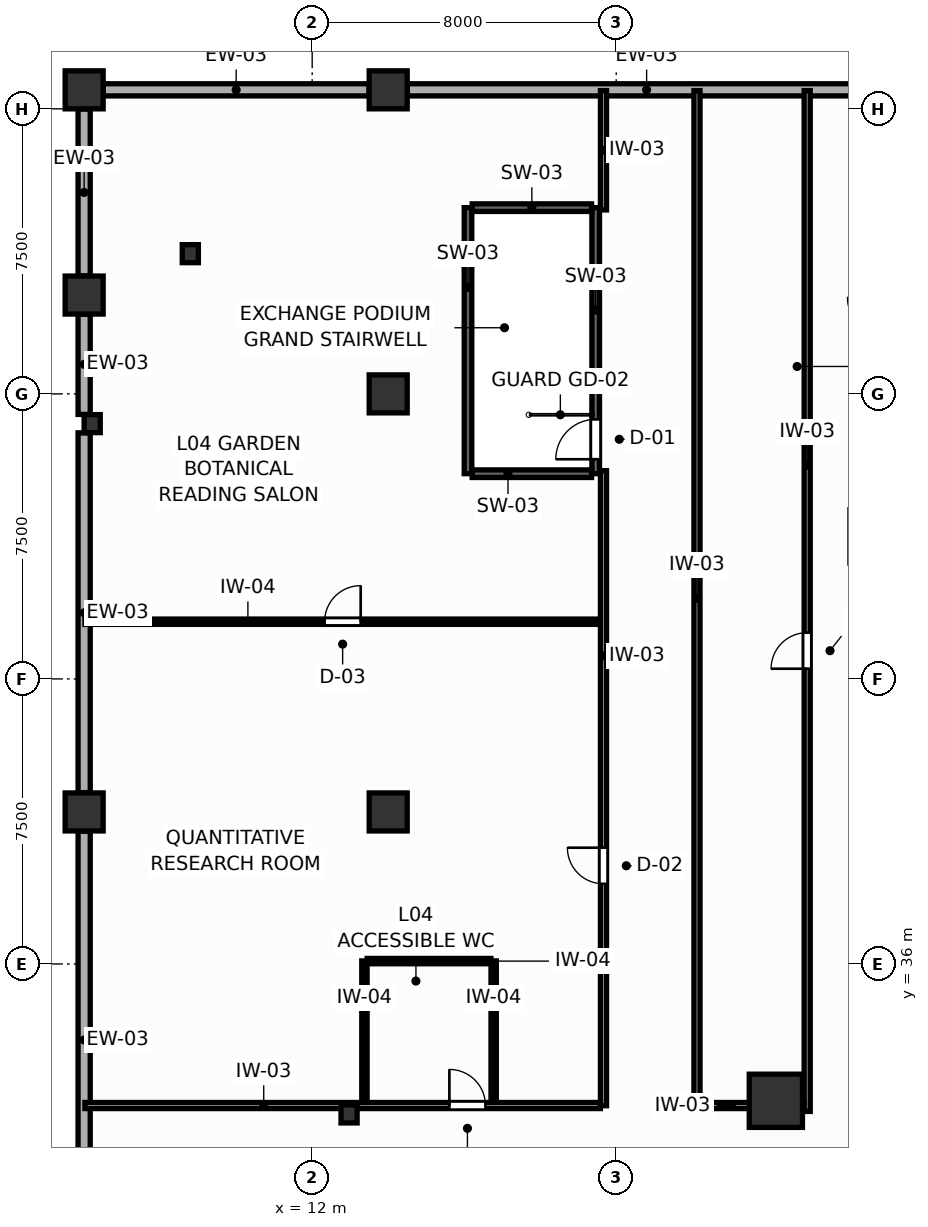
"""IFC4 building model, lengths in metres.
Left out: names, types, materials, properties, quantities, classifications, styles, units other than length and angle.
Written with IfcOpenShell. Run it as: python <this file> out.ifc"""

import sys

from ifc_helpers import new_model, si_unit, direction, frame, frame_2d, origin, origin_2d, place, context, subcontext, project, spatial, rectangle, i_section, extrude, source, transform, mapped, element, fill, save


model = new_model("IFC4")
c1 = context("Model", 3, precision=1e-05, world=origin(), true_north=direction((0.0, 1.0)))
c2 = subcontext(c1, "Body", "Model", "MODEL_VIEW")
j1 = project(units=[si_unit("LENGTHUNIT", "METRE"), si_unit("PLANEANGLEUNIT", "RADIAN")], contexts=[c1])
p1 = place(None, origin())
s1 = spatial("IfcSite", under=j1, at=p1, CompositionType="ELEMENT")
p2 = place(p1, origin())
s2 = spatial("IfcBuilding", under=s1, at=p2, CompositionType="ELEMENT")
p3 = place(p2, frame((0.0, 0.0, 19.2)))
s3 = spatial("IfcBuildingStorey", under=s2, at=p3, CompositionType="ELEMENT", Elevation=19.2)
m1 = source(origin(), c2, "Body", "SweptSolid", [
    extrude(rectangle(XDim=1.4, YDim=1.4, at=origin_2d()), origin(), (0.0, 0.0, 1.0), 4.8),
])
p4 = place(p3, frame((24.2, 32.4, 0.0), z_axis=(0.0, 0.0, 1.0), x_axis=(1.0, 0.0, 0.0)))
e1 = element("IfcColumn", 1, at=p4, inside=s3, PredefinedType="COLUMN", context=c2, shape_type="MappedRepresentation", body=[
    mapped(m1, transform((0.0, 0.0, 0.0), scale=1.0)),
])
m2 = source(origin(), c2, "Body", "SweptSolid", [
    extrude(rectangle(XDim=1.0, YDim=1.0, at=origin_2d()), origin(), (0.0, 0.0, 1.0), 4.8),
])
for number, where, z_axis, x_axis in (
    (2, (6.0, 40.0, 0.0), (0.0, 0.0, 1.0), (1.0, 0.0, 0.0)),
    (3, (6.0, 53.6, 0.0), (0.0, 0.0, 1.0), (1.0, 0.0, 0.0)),
    (4, (6.0, 59.0, 0.0), (0.0, 0.0, 1.0), (1.0, 0.0, 0.0)),
    (5, (14.0, 59.0, 0.0), (0.0, 0.0, 1.0), (1.0, 0.0, 0.0)),
    (6, (14.0, 40.0, 0.0), (0.0, 0.0, 1.0), (1.0, 0.0, 0.0)),
    (7, (14.0, 51.0, 0.0), (0.0, 0.0, 1.0), (1.0, 0.0, 0.0)),
):
    element("IfcColumn", number, at=place(p3, frame(where, z_axis=z_axis, x_axis=x_axis)), inside=s3, PredefinedType="COLUMN", context=c2, shape_type="MappedRepresentation", body=[
        mapped(m2, transform((0.0, 0.0, 0.0), scale=1.0)),
    ])
m3 = source(origin(), c2, "Body", "SweptSolid", [
    extrude(i_section(OverallWidth=0.424, OverallDepth=0.474, WebThickness=0.045, FlangeThickness=0.072, FilletRadius=0.015, at=origin_2d()), origin(), (0.0, 0.0, 1.0), 4.8),
])
for number, where, z_axis, x_axis in (
    (8, (8.793, 54.689, 0.0), (0.0, 0.0, 1.0), (1.0, 0.0, 0.0)),
    (9, (6.211, 50.217, 0.0), (0.0, 0.0, 1.0), (1.0, 0.0, 0.0)),
    (10, (12.97, 32.054, 0.0), (0.0, 0.0, 1.0), (1.0, 0.0, 0.0)),
):
    element("IfcColumn", number, at=place(p3, frame(where, z_axis=z_axis, x_axis=x_axis)), inside=s3, PredefinedType="COLUMN", context=c2, shape_type="MappedRepresentation", body=[
        mapped(m3, transform((0.0, 0.0, 0.0), scale=1.0)),
    ])
p5 = place(p3, frame((27.095, 59.0, 0.0), z_axis=(0.0, 0.0, 1.0), x_axis=(-1.0, 0.0, 0.0)))
e11 = element("IfcWall", 11, at=p5, inside=s3, PredefinedType="SOLIDWALL", context=c2, shape_type="SweptSolid", body=[
    extrude(rectangle(XDim=12.59, YDim=0.32, at=frame_2d((6.295, 0.0))), origin(), (0.0, 0.0, 1.0), 3.88),
])
p6 = place(p3, frame((13.495, 59.0, 0.0), z_axis=(0.0, 0.0, 1.0), x_axis=(-1.0, 0.0, 0.0)))
e12 = element("IfcWall", 12, at=p6, inside=s3, PredefinedType="SOLIDWALL", context=c2, shape_type="SweptSolid", body=[
    extrude(rectangle(XDim=6.99, YDim=0.32, at=frame_2d((3.495, 0.0))), origin(), (0.0, 0.0, 1.0), 3.88),
])
p7 = place(p3, frame((6.0, 58.495, 0.0), z_axis=(0.0, 0.0, 1.0), x_axis=(0.0, -1.0, 0.0)))
e13 = element("IfcWall", 13, at=p7, inside=s3, PredefinedType="SOLIDWALL", context=c2, shape_type="SweptSolid", body=[
    extrude(rectangle(XDim=4.39, YDim=0.32, at=frame_2d((2.195, 0.0))), origin(), (0.0, 0.0, 1.0), 3.88),
])
p8 = place(p3, frame((6.0, 53.095, 0.0), z_axis=(0.0, 0.0, 1.0), x_axis=(0.0, -1.0, 0.0)))
e14 = element("IfcWall", 14, at=p8, inside=s3, PredefinedType="SOLIDWALL", context=c2, shape_type="SweptSolid", body=[
    extrude(rectangle(XDim=2.636, YDim=0.32, at=frame_2d((1.318, 0.0))), origin(), (0.0, 0.0, 1.0), 3.88),
])
p9 = place(p3, frame((6.0, 49.975, 0.0), z_axis=(0.0, 0.0, 1.0), x_axis=(0.0, -1.0, 0.0)))
e15 = element("IfcWall", 15, at=p9, inside=s3, PredefinedType="SOLIDWALL", context=c2, shape_type="SweptSolid", body=[
    extrude(rectangle(XDim=9.47, YDim=0.32, at=frame_2d((4.735, 0.0))), origin(), (0.0, 0.0, 1.0), 3.88),
])
p10 = place(p3, frame((6.0, 39.495, 0.0), z_axis=(0.0, 0.0, 1.0), x_axis=(0.0, -1.0, 0.0)))
e16 = element("IfcWall", 16, at=p10, inside=s3, PredefinedType="SOLIDWALL", context=c2, shape_type="SweptSolid", body=[
    extrude(rectangle(XDim=10.99, YDim=0.32, at=frame_2d((5.495, 0.0))), origin(), (0.0, 0.0, 1.0), 3.88),
])
p11 = place(p3, frame((19.46, 48.9, 0.0), z_axis=(0.0, 0.0, 1.0), x_axis=(0.0, 1.0, 0.0)))
e17 = element("IfcWall", 17, at=p11, inside=s3, PredefinedType="SHEAR", context=c2, shape_type="SweptSolid", body=[
    extrude(rectangle(XDim=7.0, YDim=0.2, at=frame_2d((3.5, 0.0))), origin(), (0.0, 0.0, 1.0), 4.8),
])
p12 = place(p11, frame((0.38, 0.0, 0.0)))
e18 = element("IfcOpeningElement", 18, at=p12, cuts=e17, PredefinedType="OPENING", context=c2, shape_type="SweptSolid", body=[
    extrude(rectangle(XDim=1.05, YDim=2.1, at=frame_2d((0.525, 1.05))), frame((0.0, 0.11, 0.0), z_axis=(0.0, -1.0, 0.0), x_axis=(1.0, 0.0, 0.0)), (0.0, 0.0, 1.0), 0.22),
])
p13 = place(p3, frame((16.1, 48.9, 0.0), z_axis=(0.0, 0.0, 1.0), x_axis=(0.0, 1.0, 0.0)))
e19 = element("IfcWall", 19, at=p13, inside=s3, PredefinedType="SHEAR", context=c2, shape_type="SweptSolid", body=[
    extrude(rectangle(XDim=7.0, YDim=0.2, at=frame_2d((3.5, 0.0))), origin(), (0.0, 0.0, 1.0), 4.8),
])
for number, where, z_axis, x_axis in (
    (20, (16.21, 55.9, 0.0), (0.0, 0.0, 1.0), (1.0, 0.0, 0.0)),
    (21, (16.21, 48.9, 0.0), (0.0, 0.0, 1.0), (1.0, 0.0, 0.0)),
):
    element("IfcWall", number, at=place(p3, frame(where, z_axis=z_axis, x_axis=x_axis)), inside=s3, PredefinedType="SHEAR", context=c2, shape_type="SweptSolid", body=[
        extrude(rectangle(XDim=3.14, YDim=0.2, at=frame_2d((1.57, 0.0))), origin(), (0.0, 0.0, 1.0), 4.8),
    ])
p14 = place(p3, frame((25.025, 32.12, 0.0), z_axis=(0.0, 0.0, 1.0), x_axis=(0.0, 1.0, 0.0)))
e22 = element("IfcWall", 22, at=p14, inside=s3, PredefinedType="PARTITIONING", context=c2, shape_type="SweptSolid", body=[
    extrude(rectangle(XDim=26.86, YDim=0.16, at=frame_2d((13.43, 0.0))), origin(), (0.0, 0.0, 1.0), 4.58),
])
p15 = place(p14, frame((11.648, 0.0, 0.0)))
e23 = element("IfcOpeningElement", 23, at=p15, cuts=e22, PredefinedType="OPENING", context=c2, shape_type="SweptSolid", body=[
    extrude(rectangle(XDim=0.95, YDim=2.05, at=frame_2d((0.475, 1.025))), frame((0.0, 0.09, 0.0), z_axis=(0.0, -1.0, 0.0), x_axis=(1.0, 0.0, 0.0)), (0.0, 0.0, 1.0), 0.18),
])
p16 = place(p3, frame((22.125, 32.27, 0.0), z_axis=(0.0, 0.0, 1.0), x_axis=(0.0, 1.0, 0.0)))
e24 = element("IfcWall", 24, at=p16, inside=s3, PredefinedType="PARTITIONING", context=c2, shape_type="SweptSolid", body=[
    extrude(rectangle(XDim=26.71, YDim=0.16, at=frame_2d((13.355, 0.0))), origin(), (0.0, 0.0, 1.0), 4.58),
])
p17 = place(p3, frame((19.665, 32.27, 0.0), z_axis=(0.0, 0.0, 1.0), x_axis=(0.0, 1.0, 0.0)))
e25 = element("IfcWall", 25, at=p17, inside=s3, PredefinedType="PARTITIONING", context=c2, shape_type="SweptSolid", body=[
    extrude(rectangle(XDim=16.71, YDim=0.16, at=frame_2d((8.355, 0.0))), origin(), (0.0, 0.0, 1.0), 4.58),
])
p18 = place(p17, frame((5.839, 0.0, 0.0)))
e26 = element("IfcOpeningElement", 26, at=p18, cuts=e25, PredefinedType="OPENING", context=c2, shape_type="SweptSolid", body=[
    extrude(rectangle(XDim=0.95, YDim=2.05, at=frame_2d((0.475, 1.025))), frame((0.0, 0.09, 0.0), z_axis=(0.0, -1.0, 0.0), x_axis=(1.0, 0.0, 0.0)), (0.0, 0.0, 1.0), 0.18),
])
p19 = place(p3, frame((6.02, 32.275, 0.0), z_axis=(0.0, 0.0, 1.0), x_axis=(1.0, 0.0, 0.0)))
e27 = element("IfcWall", 27, at=p19, inside=s3, PredefinedType="PARTITIONING", context=c2, shape_type="SweptSolid", body=[
    extrude(rectangle(XDim=13.563, YDim=0.16, at=frame_2d((6.781, 0.0))), origin(), (0.0, 0.0, 1.0), 3.88),
])
p20 = place(p19, frame((9.59, 0.0, 0.0)))
e28 = element("IfcOpeningElement", 28, at=p20, cuts=e27, PredefinedType="OPENING", context=c2, shape_type="SweptSolid", body=[
    extrude(rectangle(XDim=0.95, YDim=2.05, at=frame_2d((0.475, 1.025))), frame((0.0, 0.09, 0.0), z_axis=(0.0, -1.0, 0.0), x_axis=(1.0, 0.0, 0.0)), (0.0, 0.0, 1.0), 0.18),
])
p21 = place(p3, frame((19.665, 55.84, 0.0), z_axis=(0.0, 0.0, 1.0), x_axis=(0.0, 1.0, 0.0)))
e29 = element("IfcWall", 29, at=p21, inside=s3, PredefinedType="PARTITIONING", context=c2, shape_type="SweptSolid", body=[
    extrude(rectangle(XDim=3.14, YDim=0.16, at=frame_2d((1.57, 0.0))), origin(), (0.0, 0.0, 1.0), 4.58),
])
p22 = place(p3, frame((22.207, 32.275, 0.0), z_axis=(0.0, 0.0, 1.0), x_axis=(1.0, 0.0, 0.0)))
e30 = element("IfcWall", 30, at=p22, inside=s3, PredefinedType="PARTITIONING", context=c2, shape_type="SweptSolid", body=[
    extrude(rectangle(XDim=2.736, YDim=0.16, at=frame_2d((1.368, 0.0))), origin(), (0.0, 0.0, 1.0), 3.88),
])
p23 = place(p3, frame((6.02, 45.005, 0.0), z_axis=(0.0, 0.0, 1.0), x_axis=(1.0, 0.0, 0.0)))
e31 = element("IfcWall", 31, at=p23, inside=s3, PredefinedType="PARTITIONING", context=c2, shape_type="SweptSolid", body=[
    extrude(rectangle(XDim=13.563, YDim=0.14, at=frame_2d((6.781, 0.0))), origin(), (0.0, 0.0, 1.0), 4.58),
])
p24 = place(p23, frame((6.306, 0.0, 0.0)))
e32 = element("IfcOpeningElement", 32, at=p24, cuts=e31, PredefinedType="OPENING", context=c2, shape_type="SweptSolid", body=[
    extrude(rectangle(XDim=0.95, YDim=2.05, at=frame_2d((0.475, 1.025))), frame((0.0, 0.08, 0.0), z_axis=(0.0, -1.0, 0.0), x_axis=(1.0, 0.0, 0.0)), (0.0, 0.0, 1.0), 0.16),
])
for number, where, z_axis, x_axis in (
    (33, (13.375, 32.357, 0.0), (0.0, 0.0, 1.0), (0.0, 1.0, 0.0)),
    (34, (16.775, 32.357, 0.0), (0.0, 0.0, 1.0), (0.0, 1.0, 0.0)),
):
    element("IfcWall", number, at=place(p3, frame(where, z_axis=z_axis, x_axis=x_axis)), inside=s3, PredefinedType="PARTITIONING", context=c2, shape_type="SweptSolid", body=[
        extrude(rectangle(XDim=3.723, YDim=0.14, at=frame_2d((1.862, 0.0))), origin(), (0.0, 0.0, 1.0), 4.58),
    ])
p25 = place(p3, frame((13.447, 36.075, 0.0), z_axis=(0.0, 0.0, 1.0), x_axis=(1.0, 0.0, 0.0)))
e35 = element("IfcWall", 35, at=p25, inside=s3, PredefinedType="PARTITIONING", context=c2, shape_type="SweptSolid", body=[
    extrude(rectangle(XDim=3.256, YDim=0.14, at=frame_2d((1.628, 0.0))), origin(), (0.0, 0.0, 1.0), 4.58),
])
p26 = place(p12, origin())
e36 = element("IfcDoor", 36, at=p26, inside=s3, OperationType="SINGLE_SWING_LEFT", PredefinedType="DOOR", context=c2, shape_type="SweptSolid", body=[
    extrude(rectangle(XDim=1.05, YDim=2.1, at=frame_2d((0.525, 1.05))), frame((0.0, 0.025, 0.0), z_axis=(0.0, -1.0, 0.0), x_axis=(1.0, 0.0, 0.0)), (0.0, 0.0, 1.0), 0.05),
])
fill(e18, e36)
p27 = place(p15, origin())
e37 = element("IfcDoor", 37, at=p27, inside=s3, OperationType="SINGLE_SWING_LEFT", PredefinedType="DOOR", context=c2, shape_type="SweptSolid", body=[
    extrude(rectangle(XDim=0.95, YDim=2.05, at=frame_2d((0.475, 1.025))), frame((0.0, 0.025, 0.0), z_axis=(0.0, -1.0, 0.0), x_axis=(1.0, 0.0, 0.0)), (0.0, 0.0, 1.0), 0.05),
])
fill(e23, e37)
p28 = place(p18, origin())
e38 = element("IfcDoor", 38, at=p28, inside=s3, OperationType="SINGLE_SWING_RIGHT", PredefinedType="DOOR", context=c2, shape_type="SweptSolid", body=[
    extrude(rectangle(XDim=0.95, YDim=2.05, at=frame_2d((0.475, 1.025))), frame((0.0, 0.025, 0.0), z_axis=(0.0, -1.0, 0.0), x_axis=(1.0, 0.0, 0.0)), (0.0, 0.0, 1.0), 0.05),
])
fill(e26, e38)
p29 = place(p20, origin())
e39 = element("IfcDoor", 39, at=p29, inside=s3, OperationType="SINGLE_SWING_LEFT", PredefinedType="DOOR", context=c2, shape_type="SweptSolid", body=[
    extrude(rectangle(XDim=0.95, YDim=2.05, at=frame_2d((0.475, 1.025))), frame((0.0, 0.025, 0.0), z_axis=(0.0, -1.0, 0.0), x_axis=(1.0, 0.0, 0.0)), (0.0, 0.0, 1.0), 0.05),
])
fill(e28, e39)
p30 = place(p24, origin())
e40 = element("IfcDoor", 40, at=p30, inside=s3, OperationType="SINGLE_SWING_RIGHT", PredefinedType="DOOR", context=c2, shape_type="SweptSolid", body=[
    extrude(rectangle(XDim=0.95, YDim=2.05, at=frame_2d((0.475, 1.025))), frame((0.0, 0.025, 0.0), z_axis=(0.0, -1.0, 0.0), x_axis=(1.0, 0.0, 0.0)), (0.0, 0.0, 1.0), 0.05),
])
fill(e32, e40)
save(model, sys.argv[1])
